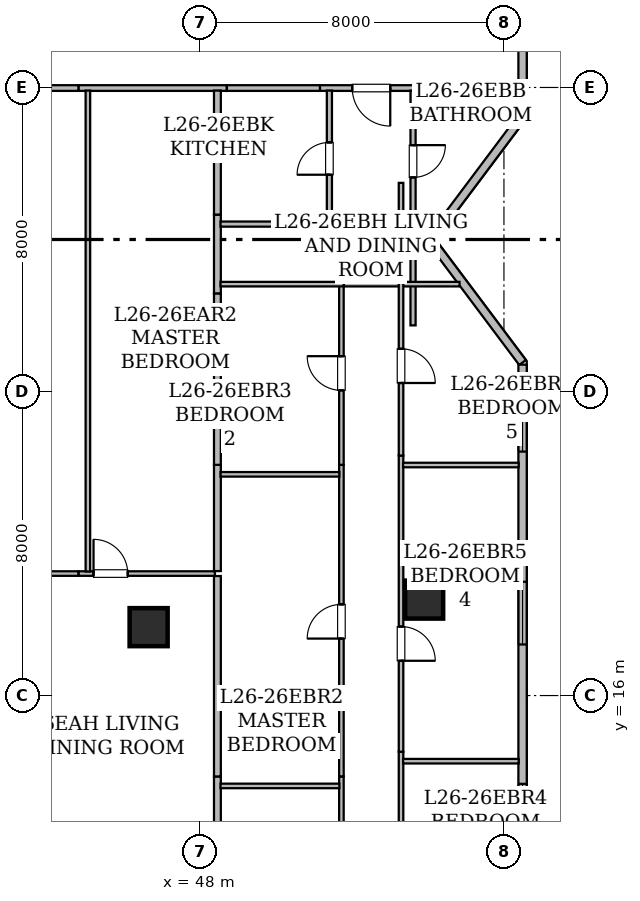
"""IFC4 building model, lengths in metres.
Left out: names, types, materials, properties, quantities, classifications, styles, units other than length and angle.
Written with IfcOpenShell. Run it as: python <this file> out.ifc"""

import sys

from ifc_helpers import new_model, si_unit, direction, frame, frame_2d, origin, origin_2d, place, context, subcontext, project, spatial, rectangle, hollow_rectangle, extrude, element, fill, save


model = new_model("IFC4")
c1 = context("Model", 3, precision=1e-05, world=origin(), true_north=direction((0.0, 1.0)))
c2 = subcontext(c1, "Body", "Model", "MODEL_VIEW")
j1 = project(units=[si_unit("LENGTHUNIT", "METRE"), si_unit("PLANEANGLEUNIT", "RADIAN")], contexts=[c1])
p1 = place(None, origin())
s1 = spatial("IfcSite", under=j1, at=p1, CompositionType="ELEMENT")
p2 = place(p1, origin())
s2 = spatial("IfcBuilding", under=s1, at=p2, CompositionType="ELEMENT")
p3 = place(p2, frame((0.0, 0.0, 105.55)))
s3 = spatial("IfcBuildingStorey", under=s2, at=p3, CompositionType="ELEMENT", Elevation=105.55)
for number, where, z_axis, x_axis in (
    (1, (53.9, 18.525, 0.0), (0.0, 0.0, 1.0), (1.0, 0.0, 0.0)),
    (2, (46.65, 17.8, 0.0), (0.0, 0.0, 1.0), (1.0, 0.0, 0.0)),
):
    element("IfcColumn", number, at=place(p3, frame(where, z_axis=z_axis, x_axis=x_axis)), inside=s3, PredefinedType="COLUMN", context=c2, shape_type="SweptSolid", body=[
        extrude(hollow_rectangle(XDim=1.0, YDim=1.0, WallThickness=0.05, at=origin_2d()), origin(), (0.0, 0.0, 1.0), 3.65),
    ])
p4 = place(p3, frame((56.49, 45.283, 0.0), z_axis=(0.0, 0.0, 1.0), x_axis=(0.0, -1.0, 0.0)))
e3 = element("IfcWall", 3, at=p4, inside=s3, PredefinedType="STANDARD", context=c2, shape_type="SweptSolid", body=[
    extrude(rectangle(XDim=14.046, YDim=0.22, at=frame_2d((7.023, 0.0))), origin(), (0.0, 0.0, 1.0), 3.43),
])
p5 = place(p4, frame((6.429, 0.0, 0.8)))
e4 = element("IfcOpeningElement", 4, at=p5, cuts=e3, PredefinedType="OPENING", context=c2, shape_type="SweptSolid", body=[
    extrude(rectangle(XDim=1.2, YDim=1.5, at=frame_2d((0.6, 0.75))), frame((0.0, 0.12, 0.0), z_axis=(0.0, -1.0, 0.0), x_axis=(1.0, 0.0, 0.0)), (0.0, 0.0, 1.0), 0.24),
])
p6 = place(p4, frame((3.044, 0.0, 0.85)))
e5 = element("IfcOpeningElement", 5, at=p6, cuts=e3, PredefinedType="OPENING", context=c2, shape_type="SweptSolid", body=[
    extrude(rectangle(XDim=1.65, YDim=1.55, at=frame_2d((0.825, 0.775))), frame((0.0, 0.12, 0.0), z_axis=(0.0, -1.0, 0.0), x_axis=(1.0, 0.0, 0.0)), (0.0, 0.0, 1.0), 0.24),
])
p7 = place(p3, frame((56.456, 31.191, 0.0), z_axis=(0.0, 0.0, 1.0), x_axis=(-0.600137081448, -0.799897170561, 0.0)))
e6 = element("IfcWall", 6, at=p7, inside=s3, PredefinedType="STANDARD", context=c2, shape_type="SweptSolid", body=[
    extrude(rectangle(XDim=3.989, YDim=0.22, at=frame_2d((1.995, 0.0))), origin(), (0.0, 0.0, 1.0), 3.43),
])
p8 = place(p3, frame((54.119, 27.924, 0.0), z_axis=(0.0, 0.0, 1.0), x_axis=(0.600039540588, -0.799970343032, 0.0)))
e7 = element("IfcWall", 7, at=p8, inside=s3, PredefinedType="STANDARD", context=c2, shape_type="SweptSolid", body=[
    extrude(rectangle(XDim=3.952, YDim=0.22, at=frame_2d((1.976, 0.0))), origin(), (0.0, 0.0, 1.0), 3.43),
])
p9 = place(p3, frame((56.49, 24.707, 0.0), z_axis=(0.0, 0.0, 1.0), x_axis=(0.0, -1.0, 0.0)))
e8 = element("IfcWall", 8, at=p9, inside=s3, PredefinedType="STANDARD", context=c2, shape_type="SweptSolid", body=[
    extrude(rectangle(XDim=14.061, YDim=0.22, at=frame_2d((7.031, 0.0))), origin(), (0.0, 0.0, 1.0), 3.43),
])
p10 = place(p9, frame((11.03, 0.0, 0.85)))
e9 = element("IfcOpeningElement", 9, at=p10, cuts=e8, PredefinedType="OPENING", context=c2, shape_type="SweptSolid", body=[
    extrude(rectangle(XDim=1.65, YDim=1.55, at=frame_2d((0.825, 0.775))), frame((0.0, 0.12, 0.0), z_axis=(0.0, -1.0, 0.0), x_axis=(1.0, 0.0, 0.0)), (0.0, 0.0, 1.0), 0.24),
])
p11 = place(p9, frame((5.713, 0.0, 0.85)))
e10 = element("IfcOpeningElement", 10, at=p11, cuts=e8, PredefinedType="OPENING", context=c2, shape_type="SweptSolid", body=[
    extrude(rectangle(XDim=1.65, YDim=1.55, at=frame_2d((0.825, 0.775))), frame((0.0, 0.12, 0.0), z_axis=(0.0, -1.0, 0.0), x_axis=(1.0, 0.0, 0.0)), (0.0, 0.0, 1.0), 0.24),
])
p12 = place(p9, frame((0.638, 0.0, 0.85)))
e11 = element("IfcOpeningElement", 11, at=p12, cuts=e8, PredefinedType="OPENING", context=c2, shape_type="SweptSolid", body=[
    extrude(rectangle(XDim=1.65, YDim=1.55, at=frame_2d((0.825, 0.775))), frame((0.0, 0.12, 0.0), z_axis=(0.0, -1.0, 0.0), x_axis=(1.0, 0.0, 0.0)), (0.0, 0.0, 1.0), 0.24),
])
p13 = place(p3, frame((48.709, 31.985, 0.0), z_axis=(0.0, 0.0, 1.0), x_axis=(-1.0, 0.0, 0.0)))
e12 = element("IfcWall", 12, at=p13, inside=s3, PredefinedType="STANDARD", context=c2, shape_type="SweptSolid", body=[
    extrude(rectangle(XDim=3.906, YDim=0.15, at=frame_2d((1.953, 0.0))), origin(), (0.0, 0.0, 1.0), 2.647),
])
p14 = place(p3, frame((44.803, 31.985, 0.0), z_axis=(0.0, 0.0, 1.0), x_axis=(-1.0, 0.0, 0.0)))
e13 = element("IfcWall", 13, at=p14, inside=s3, PredefinedType="STANDARD", context=c2, shape_type="SweptSolid", body=[
    extrude(rectangle(XDim=3.503, YDim=0.15, at=frame_2d((1.751, 0.0))), origin(), (0.0, 0.0, 1.0), 3.43),
])
p15 = place(p3, frame((53.857, 31.985, 0.0), z_axis=(0.0, 0.0, 1.0), x_axis=(-1.0, 0.0, 0.0)))
e14 = element("IfcWall", 14, at=p15, inside=s3, PredefinedType="STANDARD", context=c2, shape_type="SweptSolid", body=[
    extrude(rectangle(XDim=2.699, YDim=0.15, at=frame_2d((1.35, 0.0))), origin(), (0.0, 0.0, 1.0), 2.876),
])
p16 = place(p15, frame((0.849, 0.0, 0.0)))
e15 = element("IfcOpeningElement", 15, at=p16, cuts=e14, PredefinedType="OPENING", context=c2, shape_type="SweptSolid", body=[
    extrude(rectangle(XDim=1.0, YDim=2.15, at=frame_2d((0.5, 1.075))), frame((0.0, 0.085, 0.0), z_axis=(0.0, -1.0, 0.0), x_axis=(1.0, 0.0, 0.0)), (0.0, 0.0, 1.0), 0.17),
])
p17 = place(p3, frame((56.388, 31.985, 0.0), z_axis=(0.0, 0.0, 1.0), x_axis=(-1.0, 0.0, 0.0)))
e16 = element("IfcWall", 16, at=p17, inside=s3, PredefinedType="STANDARD", context=c2, shape_type="SweptSolid", body=[
    extrude(rectangle(XDim=2.531, YDim=0.15, at=frame_2d((1.266, 0.0))), origin(), (0.0, 0.0, 1.0), 2.876),
])
p18 = place(p3, frame((51.158, 31.985, 0.0), z_axis=(0.0, 0.0, 1.0), x_axis=(-1.0, 0.0, 0.0)))
e17 = element("IfcWall", 17, at=p18, inside=s3, PredefinedType="STANDARD", context=c2, shape_type="SweptSolid", body=[
    extrude(rectangle(XDim=2.449, YDim=0.15, at=frame_2d((1.225, 0.0))), origin(), (0.0, 0.0, 1.0), 3.43),
])
p19 = place(p3, frame((44.803, 19.21, 0.0), z_axis=(0.0, 0.0, 1.0), x_axis=(1.0, 0.0, 0.0)))
e18 = element("IfcWall", 18, at=p19, inside=s3, PredefinedType="PARTITIONING", context=c2, shape_type="SweptSolid", body=[
    extrude(rectangle(XDim=3.592, YDim=0.12, at=frame_2d((1.796, 0.0))), origin(), (0.0, 0.0, 1.0), 2.647),
])
p20 = place(p19, frame((0.397, 0.0, 0.0)))
e19 = element("IfcOpeningElement", 19, at=p20, cuts=e18, PredefinedType="OPENING", context=c2, shape_type="SweptSolid", body=[
    extrude(rectangle(XDim=0.9, YDim=2.1, at=frame_2d((0.45, 1.05))), frame((0.0, 0.07, 0.0), z_axis=(0.0, -1.0, 0.0), x_axis=(1.0, 0.0, 0.0)), (0.0, 0.0, 1.0), 0.14),
])
p21 = place(p3, frame((41.432, 19.21, 0.0), z_axis=(0.0, 0.0, 1.0), x_axis=(1.0, 0.0, 0.0)))
e20 = element("IfcWall", 20, at=p21, inside=s3, PredefinedType="PARTITIONING", context=c2, shape_type="SweptSolid", body=[
    extrude(rectangle(XDim=3.371, YDim=0.12, at=frame_2d((1.686, 0.0))), origin(), (0.0, 0.0, 1.0), 3.43),
])
p22 = place(p21, frame((1.236, 0.0, 0.0)))
e21 = element("IfcOpeningElement", 21, at=p22, cuts=e20, PredefinedType="OPENING", context=c2, shape_type="SweptSolid", body=[
    extrude(rectangle(XDim=0.9, YDim=2.1, at=frame_2d((0.45, 1.05))), frame((0.0, 0.07, 0.0), z_axis=(0.0, -1.0, 0.0), x_axis=(1.0, 0.0, 0.0)), (0.0, 0.0, 1.0), 0.14),
])
p23 = place(p3, frame((48.46, 13.871, 0.0), z_axis=(0.0, 0.0, 1.0), x_axis=(0.0, -1.0, 0.0)))
e22 = element("IfcWall", 22, at=p23, inside=s3, PredefinedType="STANDARD", context=c2, shape_type="SweptSolid", body=[
    extrude(rectangle(XDim=3.196, YDim=0.18, at=frame_2d((1.598, 0.0))), origin(), (0.0, 0.0, 1.0), 2.647),
])
p24 = place(p3, frame((48.46, 19.145, 0.0), z_axis=(0.0, 0.0, 1.0), x_axis=(0.0, -1.0, 0.0)))
e23 = element("IfcWall", 23, at=p24, inside=s3, PredefinedType="STANDARD", context=c2, shape_type="SweptSolid", body=[
    extrude(rectangle(XDim=5.274, YDim=0.18, at=frame_2d((2.637, 0.0))), origin(), (0.0, 0.0, 1.0), 2.647),
])
p25 = place(p3, frame((45.052, 19.264, 0.0), z_axis=(0.0, 0.0, 1.0), x_axis=(0.0, 1.0, 0.0)))
e24 = element("IfcWall", 24, at=p25, inside=s3, PredefinedType="PARTITIONING", context=c2, shape_type="SweptSolid", body=[
    extrude(rectangle(XDim=12.654, YDim=0.12, at=frame_2d((6.327, 0.0))), origin(), (0.0, 0.0, 1.0), 2.961),
])
p26 = place(p3, frame((48.46, 28.654, 0.0), z_axis=(0.0, 0.0, 1.0), x_axis=(0.0, -1.0, 0.0)))
e25 = element("IfcWall", 25, at=p26, inside=s3, PredefinedType="STANDARD", context=c2, shape_type="SweptSolid", body=[
    extrude(rectangle(XDim=2.078, YDim=0.18, at=frame_2d((1.039, 0.0))), origin(), (0.0, 0.0, 1.0), 3.43),
])
p27 = place(p3, frame((48.46, 31.918, 0.0), z_axis=(0.0, 0.0, 1.0), x_axis=(0.0, -1.0, 0.0)))
e26 = element("IfcWall", 26, at=p27, inside=s3, PredefinedType="STANDARD", context=c2, shape_type="SweptSolid", body=[
    extrude(rectangle(XDim=3.264, YDim=0.18, at=frame_2d((1.632, 0.0))), origin(), (0.0, 0.0, 1.0), 3.43),
])
p28 = place(p3, frame((48.46, 22.07, 0.0), z_axis=(0.0, 0.0, 1.0), x_axis=(0.0, -1.0, 0.0)))
e27 = element("IfcWall", 27, at=p28, inside=s3, PredefinedType="STANDARD", context=c2, shape_type="SweptSolid", body=[
    extrude(rectangle(XDim=2.795, YDim=0.18, at=frame_2d((1.397, 0.0))), origin(), (0.0, 0.0, 1.0), 3.43),
])
p29 = place(p3, frame((48.46, 26.576, 0.0), z_axis=(0.0, 0.0, 1.0), x_axis=(0.0, -1.0, 0.0)))
e28 = element("IfcWall", 28, at=p29, inside=s3, PredefinedType="STANDARD", context=c2, shape_type="SweptSolid", body=[
    extrude(rectangle(XDim=4.506, YDim=0.18, at=frame_2d((2.253, 0.0))), origin(), (0.0, 0.0, 1.0), 3.43),
])
p30 = place(p3, frame((53.608, 31.918, 0.0), z_axis=(0.0, 0.0, 1.0), x_axis=(0.0, -1.0, 0.0)))
e29 = element("IfcWall", 29, at=p30, inside=s3, PredefinedType="PARTITIONING", context=c2, shape_type="SweptSolid", body=[
    extrude(rectangle(XDim=6.178, YDim=0.135, at=frame_2d((3.089, 0.0))), origin(), (0.0, 0.0, 1.0), 2.876),
])
p31 = place(p30, frame((1.435, 0.0, 0.0)))
e30 = element("IfcOpeningElement", 30, at=p31, cuts=e29, PredefinedType="OPENING", context=c2, shape_type="SweptSolid", body=[
    extrude(rectangle(XDim=0.85, YDim=2.1, at=frame_2d((0.425, 1.05))), frame((0.0, 0.077, 0.0), z_axis=(0.0, -1.0, 0.0), x_axis=(1.0, 0.0, 0.0)), (0.0, 0.0, 1.0), 0.155),
])
p32 = place(p3, frame((50.943, 28.405, 0.0), z_axis=(0.0, 0.0, 1.0), x_axis=(1.0, 0.0, 0.0)))
e31 = element("IfcWall", 31, at=p32, inside=s3, PredefinedType="PARTITIONING", context=c2, shape_type="SweptSolid", body=[
    extrude(rectangle(XDim=3.311, YDim=0.135, at=frame_2d((1.655, 0.0))), origin(), (0.0, 0.0, 1.0), 2.876),
])
p33 = place(p3, frame((48.542, 28.405, 0.0), z_axis=(0.0, 0.0, 1.0), x_axis=(1.0, 0.0, 0.0)))
e32 = element("IfcWall", 32, at=p33, inside=s3, PredefinedType="PARTITIONING", context=c2, shape_type="SweptSolid", body=[
    extrude(rectangle(XDim=2.401, YDim=0.135, at=frame_2d((1.201, 0.0))), origin(), (0.0, 0.0, 1.0), 3.43),
])
p34 = place(p3, frame((51.407, 28.34, 0.0), z_axis=(0.0, 0.0, 1.0), x_axis=(0.0, 1.0, 0.0)))
e33 = element("IfcWall", 33, at=p34, inside=s3, PredefinedType="PARTITIONING", context=c2, shape_type="SweptSolid", body=[
    extrude(rectangle(XDim=3.578, YDim=0.135, at=frame_2d((1.789, 0.0))), origin(), (0.0, 0.0, 1.0), 3.43),
])
p35 = place(p34, frame((1.364, 0.0, 0.0)))
e34 = element("IfcOpeningElement", 34, at=p35, cuts=e33, PredefinedType="OPENING", context=c2, shape_type="SweptSolid", body=[
    extrude(rectangle(XDim=0.85, YDim=2.1, at=frame_2d((0.425, 1.05))), frame((0.0, 0.077, 0.0), z_axis=(0.0, -1.0, 0.0), x_axis=(1.0, 0.0, 0.0)), (0.0, 0.0, 1.0), 0.155),
])
p36 = place(p3, frame((51.723, 6.612, 0.0), z_axis=(0.0, 0.0, 1.0), x_axis=(0.0, 1.0, 0.0)))
e35 = element("IfcWall", 35, at=p36, inside=s3, PredefinedType="PARTITIONING", context=c2, shape_type="SweptSolid", body=[
    extrude(rectangle(XDim=7.259, YDim=0.12, at=frame_2d((3.629, 0.0))), origin(), (0.0, 0.0, 1.0), 2.876),
])
p37 = place(p36, frame((3.158, 0.0, 0.0)))
e36 = element("IfcOpeningElement", 36, at=p37, cuts=e35, PredefinedType="OPENING", context=c2, shape_type="SweptSolid", body=[
    extrude(rectangle(XDim=0.9, YDim=2.1, at=frame_2d((0.45, 1.05))), frame((0.0, 0.07, 0.0), z_axis=(0.0, -1.0, 0.0), x_axis=(1.0, 0.0, 0.0)), (0.0, 0.0, 1.0), 0.14),
])
p38 = place(p3, frame((51.723, 13.871, 0.0), z_axis=(0.0, 0.0, 1.0), x_axis=(0.0, 1.0, 0.0)))
e37 = element("IfcWall", 37, at=p38, inside=s3, PredefinedType="PARTITIONING", context=c2, shape_type="SweptSolid", body=[
    extrude(rectangle(XDim=8.199, YDim=0.12, at=frame_2d((4.1, 0.0))), origin(), (0.0, 0.0, 1.0), 2.647),
])
p39 = place(p38, frame((3.628, 0.0, 0.0)))
e38 = element("IfcOpeningElement", 38, at=p39, cuts=e37, PredefinedType="OPENING", context=c2, shape_type="SweptSolid", body=[
    extrude(rectangle(XDim=0.9, YDim=2.1, at=frame_2d((0.45, 1.05))), frame((0.0, 0.07, 0.0), z_axis=(0.0, -1.0, 0.0), x_axis=(1.0, 0.0, 0.0)), (0.0, 0.0, 1.0), 0.14),
])
p40 = place(p3, frame((51.723, 22.07, 0.0), z_axis=(0.0, 0.0, 1.0), x_axis=(0.0, 1.0, 0.0)))
e39 = element("IfcWall", 39, at=p40, inside=s3, PredefinedType="PARTITIONING", context=c2, shape_type="SweptSolid", body=[
    extrude(rectangle(XDim=4.82, YDim=0.12, at=frame_2d((2.41, 0.0))), origin(), (0.0, 0.0, 1.0), 3.43),
])
p41 = place(p40, frame((1.96, 0.0, 0.0)))
e40 = element("IfcOpeningElement", 40, at=p41, cuts=e39, PredefinedType="OPENING", context=c2, shape_type="SweptSolid", body=[
    extrude(rectangle(XDim=0.9, YDim=2.1, at=frame_2d((0.45, 1.05))), frame((0.0, 0.07, 0.0), z_axis=(0.0, -1.0, 0.0), x_axis=(1.0, 0.0, 0.0)), (0.0, 0.0, 1.0), 0.14),
])
p42 = place(p3, frame((51.788, 26.825, 0.0), z_axis=(0.0, 0.0, 1.0), x_axis=(-1.0, 0.0, 0.0)))
e41 = element("IfcWall", 41, at=p42, inside=s3, PredefinedType="PARTITIONING", context=c2, shape_type="SweptSolid", body=[
    extrude(rectangle(XDim=3.246, YDim=0.12, at=frame_2d((1.623, 0.0))), origin(), (0.0, 0.0, 1.0), 3.43),
])
p43 = place(p3, frame((53.292, 14.522, 0.0), z_axis=(0.0, 0.0, 1.0), x_axis=(0.0, -1.0, 0.0)))
e42 = element("IfcWall", 42, at=p43, inside=s3, PredefinedType="PARTITIONING", context=c2, shape_type="SweptSolid", body=[
    extrude(rectangle(XDim=7.083, YDim=0.12, at=frame_2d((3.542, 0.0))), origin(), (0.0, 0.0, 1.0), 3.43),
])
p44 = place(p43, frame((3.112, 0.0, 0.0)))
e43 = element("IfcOpeningElement", 43, at=p44, cuts=e42, PredefinedType="OPENING", context=c2, shape_type="SweptSolid", body=[
    extrude(rectangle(XDim=0.9, YDim=2.1, at=frame_2d((0.45, 1.05))), frame((0.0, 0.07, 0.0), z_axis=(0.0, -1.0, 0.0), x_axis=(1.0, 0.0, 0.0)), (0.0, 0.0, 1.0), 0.14),
])
p45 = place(p3, frame((53.292, 22.315, 0.0), z_axis=(0.0, 0.0, 1.0), x_axis=(0.0, -1.0, 0.0)))
e44 = element("IfcWall", 44, at=p45, inside=s3, PredefinedType="PARTITIONING", context=c2, shape_type="SweptSolid", body=[
    extrude(rectangle(XDim=7.793, YDim=0.12, at=frame_2d((3.896, 0.0))), origin(), (0.0, 0.0, 1.0), 2.647),
])
p46 = place(p45, frame((4.5, 0.0, 0.0)))
e45 = element("IfcOpeningElement", 45, at=p46, cuts=e44, PredefinedType="OPENING", context=c2, shape_type="SweptSolid", body=[
    extrude(rectangle(XDim=0.9, YDim=2.1, at=frame_2d((0.45, 1.05))), frame((0.0, 0.07, 0.0), z_axis=(0.0, -1.0, 0.0), x_axis=(1.0, 0.0, 0.0)), (0.0, 0.0, 1.0), 0.14),
])
p47 = place(p3, frame((54.832, 26.825, 0.0), z_axis=(0.0, 0.0, 1.0), x_axis=(-1.0, 0.0, 0.0)))
e46 = element("IfcWall", 46, at=p47, inside=s3, PredefinedType="PARTITIONING", context=c2, shape_type="SweptSolid", body=[
    extrude(rectangle(XDim=3.044, YDim=0.12, at=frame_2d((1.522, 0.0))), origin(), (0.0, 0.0, 1.0), 2.876),
])
p48 = place(p3, frame((53.292, 29.49, 0.0), z_axis=(0.0, 0.0, 1.0), x_axis=(0.0, -1.0, 0.0)))
e47 = element("IfcWall", 47, at=p48, inside=s3, PredefinedType="PARTITIONING", context=c2, shape_type="SweptSolid", body=[
    extrude(rectangle(XDim=7.175, YDim=0.12, at=frame_2d((3.587, 0.0))), origin(), (0.0, 0.0, 1.0), 3.43),
])
p49 = place(p48, frame((4.366, 0.0, 0.0)))
e48 = element("IfcOpeningElement", 48, at=p49, cuts=e47, PredefinedType="OPENING", context=c2, shape_type="SweptSolid", body=[
    extrude(rectangle(XDim=0.9, YDim=2.1, at=frame_2d((0.45, 1.05))), frame((0.0, 0.07, 0.0), z_axis=(0.0, -1.0, 0.0), x_axis=(1.0, 0.0, 0.0)), (0.0, 0.0, 1.0), 0.14),
])
for number, where, z_axis, x_axis in (
    (49, (48.542, 13.622, 0.0), (0.0, 0.0, 1.0), (1.0, 0.0, 0.0)),
    (50, (48.542, 21.821, 0.0), (0.0, 0.0, 1.0), (1.0, 0.0, 0.0)),
):
    element("IfcWall", number, at=place(p3, frame(where, z_axis=z_axis, x_axis=x_axis)), inside=s3, PredefinedType="PARTITIONING", context=c2, shape_type="SweptSolid", body=[
        extrude(rectangle(XDim=3.127, YDim=0.12, at=frame_2d((1.563, 0.0))), origin(), (0.0, 0.0, 1.0), 3.43),
    ])
p50 = place(p3, frame((53.346, 14.273, 0.0), z_axis=(0.0, 0.0, 1.0), x_axis=(1.0, 0.0, 0.0)))
e51 = element("IfcWall", 51, at=p50, inside=s3, PredefinedType="PARTITIONING", context=c2, shape_type="SweptSolid", body=[
    extrude(rectangle(XDim=3.042, YDim=0.12, at=frame_2d((1.521, 0.0))), origin(), (0.0, 0.0, 1.0), 3.43),
])
p51 = place(p3, frame((53.346, 22.066, 0.0), z_axis=(0.0, 0.0, 1.0), x_axis=(1.0, 0.0, 0.0)))
e52 = element("IfcWall", 52, at=p51, inside=s3, PredefinedType="PARTITIONING", context=c2, shape_type="SweptSolid", body=[
    extrude(rectangle(XDim=3.042, YDim=0.12, at=frame_2d((1.521, 0.0))), origin(), (0.0, 0.0, 1.0), 2.876),
])
p52 = place(p10, origin())
e53 = element("IfcWindow", 53, at=p52, inside=s3, PartitioningType="SINGLE_PANEL", PredefinedType="WINDOW", context=c2, shape_type="SweptSolid", body=[
    extrude(rectangle(XDim=1.65, YDim=1.55, at=frame_2d((0.825, 0.775))), frame((0.0, 0.03, 0.0), z_axis=(0.0, -1.0, 0.0), x_axis=(1.0, 0.0, 0.0)), (0.0, 0.0, 1.0), 0.06),
])
fill(e9, e53)
p53 = place(p11, origin())
e54 = element("IfcWindow", 54, at=p53, inside=s3, PartitioningType="SINGLE_PANEL", PredefinedType="WINDOW", context=c2, shape_type="SweptSolid", body=[
    extrude(rectangle(XDim=1.65, YDim=1.55, at=frame_2d((0.825, 0.775))), frame((0.0, 0.03, 0.0), z_axis=(0.0, -1.0, 0.0), x_axis=(1.0, 0.0, 0.0)), (0.0, 0.0, 1.0), 0.06),
])
fill(e10, e54)
p54 = place(p12, origin())
e55 = element("IfcWindow", 55, at=p54, inside=s3, PartitioningType="SINGLE_PANEL", PredefinedType="WINDOW", context=c2, shape_type="SweptSolid", body=[
    extrude(rectangle(XDim=1.65, YDim=1.55, at=frame_2d((0.825, 0.775))), frame((0.0, 0.03, 0.0), z_axis=(0.0, -1.0, 0.0), x_axis=(1.0, 0.0, 0.0)), (0.0, 0.0, 1.0), 0.06),
])
fill(e11, e55)
p55 = place(p16, origin())
e56 = element("IfcDoor", 56, at=p55, inside=s3, OperationType="SINGLE_SWING_LEFT", PredefinedType="DOOR", context=c2, shape_type="SweptSolid", body=[
    extrude(rectangle(XDim=1.0, YDim=2.15, at=frame_2d((0.5, 1.075))), frame((0.0, 0.025, 0.0), z_axis=(0.0, -1.0, 0.0), x_axis=(1.0, 0.0, 0.0)), (0.0, 0.0, 1.0), 0.05),
])
fill(e15, e56)
p56 = place(p20, origin())
e57 = element("IfcDoor", 57, at=p56, inside=s3, OperationType="SINGLE_SWING_LEFT", PredefinedType="DOOR", context=c2, shape_type="SweptSolid", body=[
    extrude(rectangle(XDim=0.9, YDim=2.1, at=frame_2d((0.45, 1.05))), frame((0.0, 0.025, 0.0), z_axis=(0.0, -1.0, 0.0), x_axis=(1.0, 0.0, 0.0)), (0.0, 0.0, 1.0), 0.05),
])
fill(e19, e57)
p57 = place(p31, origin())
e58 = element("IfcDoor", 58, at=p57, inside=s3, OperationType="SINGLE_SWING_LEFT", PredefinedType="DOOR", context=c2, shape_type="SweptSolid", body=[
    extrude(rectangle(XDim=0.85, YDim=2.1, at=frame_2d((0.425, 1.05))), frame((0.0, 0.025, 0.0), z_axis=(0.0, -1.0, 0.0), x_axis=(1.0, 0.0, 0.0)), (0.0, 0.0, 1.0), 0.05),
])
fill(e30, e58)
p58 = place(p35, origin())
e59 = element("IfcDoor", 59, at=p58, inside=s3, OperationType="SINGLE_SWING_LEFT", PredefinedType="DOOR", context=c2, shape_type="SweptSolid", body=[
    extrude(rectangle(XDim=0.85, YDim=2.1, at=frame_2d((0.425, 1.05))), frame((0.0, 0.025, 0.0), z_axis=(0.0, -1.0, 0.0), x_axis=(1.0, 0.0, 0.0)), (0.0, 0.0, 1.0), 0.05),
])
fill(e34, e59)
p59 = place(p39, origin())
e60 = element("IfcDoor", 60, at=p59, inside=s3, OperationType="SINGLE_SWING_LEFT", PredefinedType="DOOR", context=c2, shape_type="SweptSolid", body=[
    extrude(rectangle(XDim=0.9, YDim=2.1, at=frame_2d((0.45, 1.05))), frame((0.0, 0.025, 0.0), z_axis=(0.0, -1.0, 0.0), x_axis=(1.0, 0.0, 0.0)), (0.0, 0.0, 1.0), 0.05),
])
fill(e38, e60)
p60 = place(p41, origin())
e61 = element("IfcDoor", 61, at=p60, inside=s3, OperationType="SINGLE_SWING_RIGHT", PredefinedType="DOOR", context=c2, shape_type="SweptSolid", body=[
    extrude(rectangle(XDim=0.9, YDim=2.1, at=frame_2d((0.45, 1.05))), frame((0.0, 0.025, 0.0), z_axis=(0.0, -1.0, 0.0), x_axis=(1.0, 0.0, 0.0)), (0.0, 0.0, 1.0), 0.05),
])
fill(e40, e61)
p61 = place(p46, origin())
e62 = element("IfcDoor", 62, at=p61, inside=s3, OperationType="SINGLE_SWING_RIGHT", PredefinedType="DOOR", context=c2, shape_type="SweptSolid", body=[
    extrude(rectangle(XDim=0.9, YDim=2.1, at=frame_2d((0.45, 1.05))), frame((0.0, 0.025, 0.0), z_axis=(0.0, -1.0, 0.0), x_axis=(1.0, 0.0, 0.0)), (0.0, 0.0, 1.0), 0.05),
])
fill(e45, e62)
p62 = place(p49, origin())
e63 = element("IfcDoor", 63, at=p62, inside=s3, OperationType="SINGLE_SWING_RIGHT", PredefinedType="DOOR", context=c2, shape_type="SweptSolid", body=[
    extrude(rectangle(XDim=0.9, YDim=2.1, at=frame_2d((0.45, 1.05))), frame((0.0, 0.025, 0.0), z_axis=(0.0, -1.0, 0.0), x_axis=(1.0, 0.0, 0.0)), (0.0, 0.0, 1.0), 0.05),
])
fill(e48, e63)
save(model, sys.argv[1])
